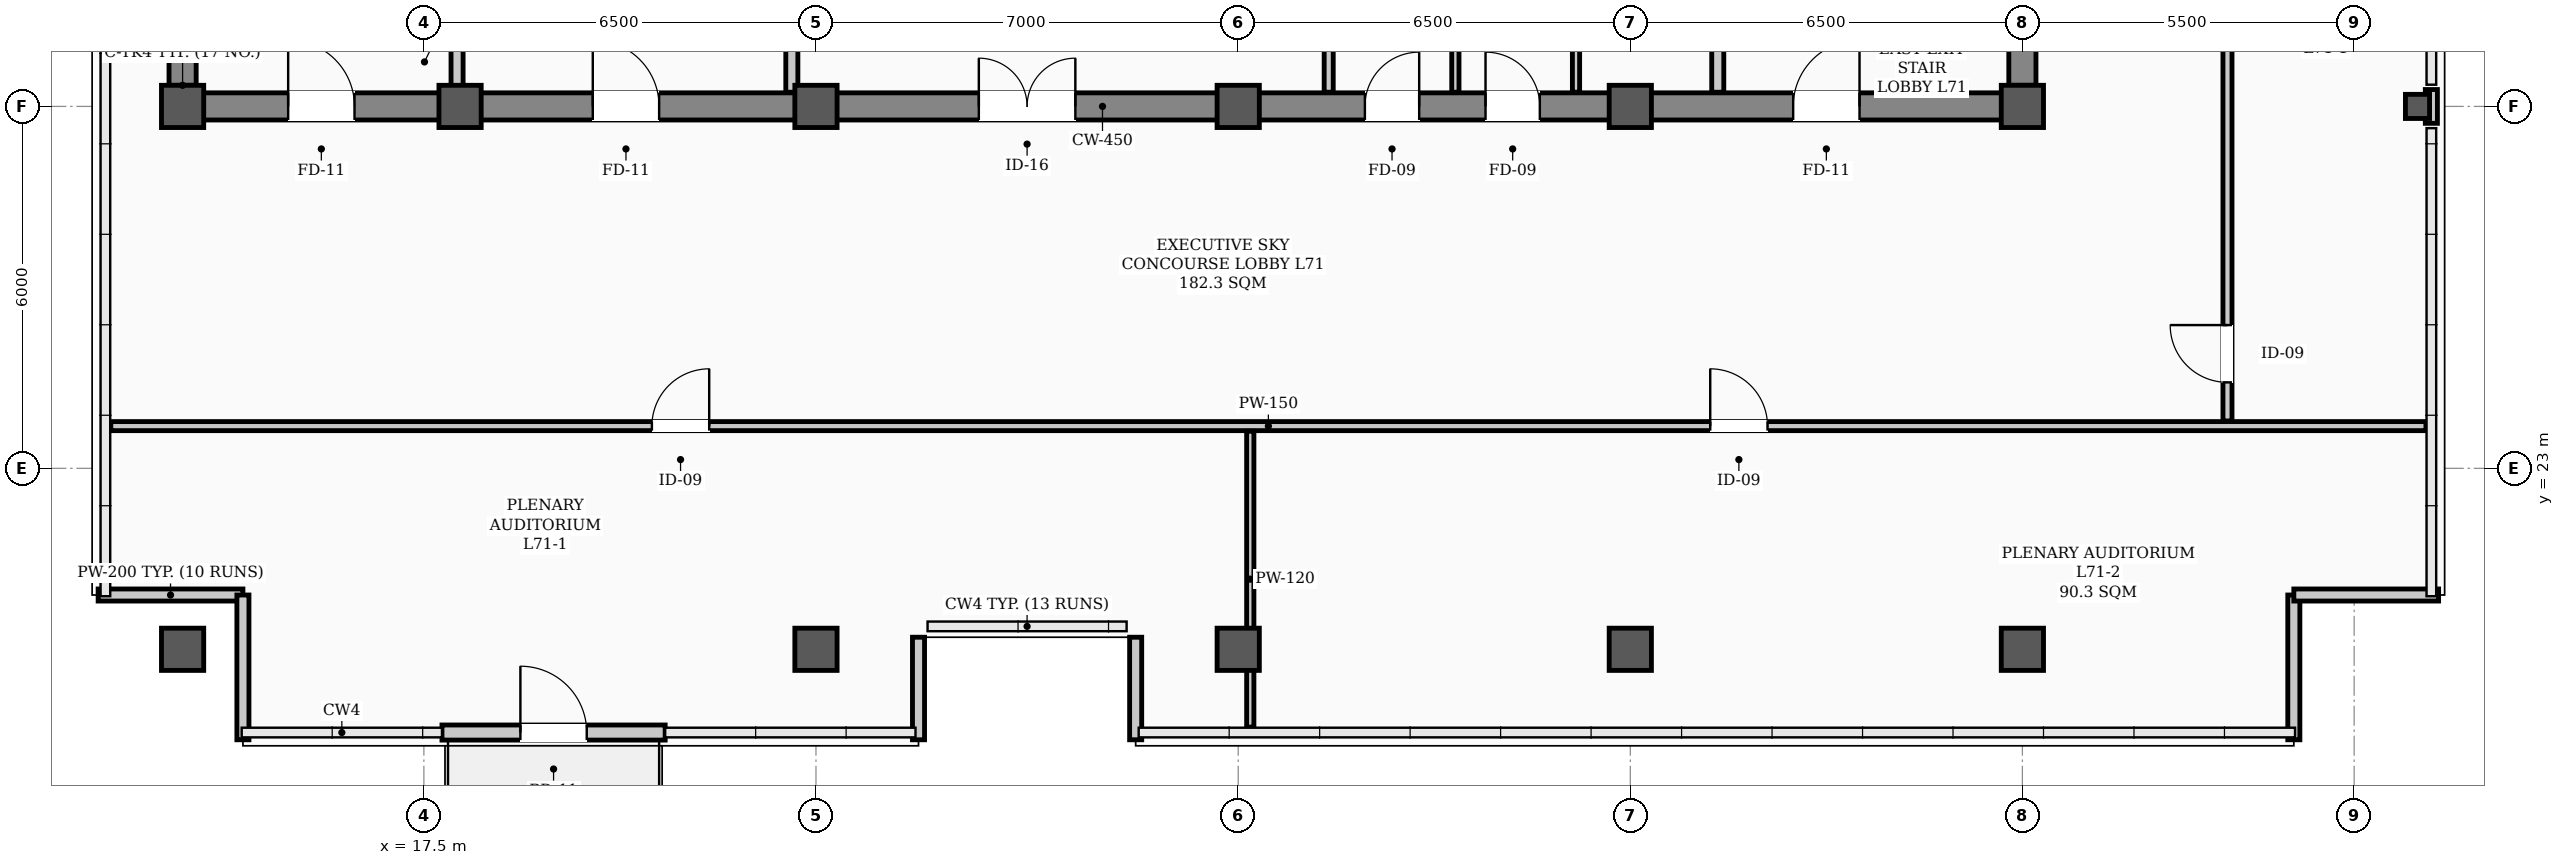
"""IFC4 building model, lengths in metres.
Left out: names, types, materials, properties, quantities, classifications, styles, units other than length and angle.
Written with IfcOpenShell. Run it as: python <this file> out.ifc"""

import sys

from ifc_helpers import new_model, si_unit, direction, frame, frame_2d, origin, origin_2d, place, context, subcontext, project, spatial, rectangle, hollow_rectangle, extrude, element, fill, save


model = new_model("IFC4")
c1 = context("Model", 3, precision=1e-05, world=origin(), true_north=direction((0.0, 1.0)))
c2 = subcontext(c1, "Body", "Model", "MODEL_VIEW")
j1 = project(units=[si_unit("LENGTHUNIT", "METRE"), si_unit("PLANEANGLEUNIT", "RADIAN")], contexts=[c1])
p1 = place(None, origin())
s1 = spatial("IfcSite", under=j1, at=p1, CompositionType="ELEMENT")
p2 = place(p1, origin())
s2 = spatial("IfcBuilding", under=s1, at=p2, CompositionType="ELEMENT")
p3 = place(p2, frame((0.0, 0.0, 285.2)))
s3 = spatial("IfcBuildingStorey", under=s2, at=p3, CompositionType="ELEMENT", Elevation=285.2)
for number, where, z_axis, x_axis in (
    (1, (13.5, 29.0, 0.0), (0.0, 0.0, 1.0), (1.0, 0.0, 0.0)),
    (2, (18.1, 29.0, 0.0), (0.0, 0.0, 1.0), (1.0, 0.0, 0.0)),
    (3, (24.0, 29.0, 0.0), (0.0, 0.0, 1.0), (1.0, 0.0, 0.0)),
    (4, (31.0, 29.0, 0.0), (0.0, 0.0, 1.0), (1.0, 0.0, 0.0)),
    (5, (37.5, 29.0, 0.0), (0.0, 0.0, 1.0), (1.0, 0.0, 0.0)),
    (6, (44.0, 29.0, 0.0), (0.0, 0.0, 1.0), (1.0, 0.0, 0.0)),
    (7, (13.5, 20.0, 0.0), (0.0, 0.0, 1.0), (1.0, 0.0, 0.0)),
    (8, (24.0, 20.0, 0.0), (0.0, 0.0, 1.0), (1.0, 0.0, 0.0)),
    (9, (31.0, 20.0, 0.0), (0.0, 0.0, 1.0), (1.0, 0.0, 0.0)),
    (10, (37.5, 20.0, 0.0), (0.0, 0.0, 1.0), (1.0, 0.0, 0.0)),
    (11, (44.0, 20.0, 0.0), (0.0, 0.0, 1.0), (1.0, 0.0, 0.0)),
):
    element("IfcColumn", number, at=place(p3, frame(where, z_axis=z_axis, x_axis=x_axis)), inside=s3, PredefinedType="COLUMN", context=c2, shape_type="SweptSolid", body=[
        extrude(hollow_rectangle(XDim=0.7, YDim=0.7, WallThickness=0.028, InnerFilletRadius=0.014, OuterFilletRadius=0.042, at=origin_2d()), origin(), (0.0, 0.0, 1.0), 3.9),
    ])
p4 = place(p3, frame((50.55, 29.0, 0.0), z_axis=(0.0, 0.0, 1.0), x_axis=(1.0, 0.0, 0.0)))
e12 = element("IfcColumn", 12, at=p4, inside=s3, PredefinedType="COLUMN", context=c2, shape_type="SweptSolid", body=[
    extrude(hollow_rectangle(XDim=0.4, YDim=0.4, WallThickness=0.02, InnerFilletRadius=0.02, OuterFilletRadius=0.04, at=origin_2d()), origin(), (0.0, 0.0, 1.0), 3.9),
])
p5 = place(p3, frame((50.78, 28.72, 0.0), z_axis=(0.0, 0.0, 1.0), x_axis=(0.0, 1.0, 0.0)))
e13 = element("IfcWall", 13, at=p5, inside=s3, PredefinedType="PARAPET", context=c2, shape_type="SweptSolid", body=[
    extrude(rectangle(XDim=0.56, YDim=0.2, at=frame_2d((0.28, 0.0))), origin(), (0.0, 0.0, 1.0), 1.2),
])
for number, where, z_axis, x_axis in (
    (14, (12.1, 20.9, 0.0), (0.0, 0.0, 1.0), (1.0, 0.0, 0.0)),
    (15, (14.5, 20.9, 0.0), (0.0, 0.0, 1.0), (0.0, -1.0, 0.0)),
    (16, (48.5, 18.5, 0.0), (0.0, 0.0, 1.0), (0.0, 1.0, 0.0)),
    (17, (48.5, 20.9, 0.0), (0.0, 0.0, 1.0), (1.0, 0.0, 0.0)),
):
    element("IfcWall", number, at=place(p3, frame(where, z_axis=z_axis, x_axis=x_axis)), inside=s3, PredefinedType="PARAPET", context=c2, shape_type="SweptSolid", body=[
        extrude(rectangle(XDim=2.4, YDim=0.2, at=frame_2d((1.2, 0.0))), origin(), (0.0, 0.0, 1.0), 1.2),
    ])
for number, where, z_axis, x_axis in (
    (18, (25.7, 18.5, 0.0), (0.0, 0.0, 1.0), (0.0, 1.0, 0.0)),
    (19, (29.3, 20.2, 0.0), (0.0, 0.0, 1.0), (0.0, -1.0, 0.0)),
):
    element("IfcWall", number, at=place(p3, frame(where, z_axis=z_axis, x_axis=x_axis)), inside=s3, PredefinedType="PARAPET", context=c2, shape_type="SweptSolid", body=[
        extrude(rectangle(XDim=1.7, YDim=0.2, at=frame_2d((0.85, 0.0))), origin(), (0.0, 0.0, 1.0), 1.2),
    ])
p6 = place(p3, frame((17.8, 18.62, 0.0), z_axis=(0.0, 0.0, 1.0), x_axis=(1.0, 0.0, 0.0)))
e20 = element("IfcWall", 20, at=p6, inside=s3, PredefinedType="STANDARD", context=c2, shape_type="SweptSolid", body=[
    extrude(rectangle(XDim=3.7, YDim=0.25, at=frame_2d((1.85, 0.0))), origin(), (0.0, 0.0, 1.0), 3.18),
])
p7 = place(p6, frame((1.3, 0.0, 0.0)))
e21 = element("IfcOpeningElement", 21, at=p7, cuts=e20, PredefinedType="OPENING", context=c2, shape_type="SweptSolid", body=[
    extrude(rectangle(XDim=1.1, YDim=2.2, at=frame_2d((0.55, 1.1))), frame((0.0, 0.135, 0.0), z_axis=(0.0, -1.0, 0.0), x_axis=(1.0, 0.0, 0.0)), (0.0, 0.0, 1.0), 0.27),
])
p8 = place(p3, frame((13.5, 29.0, 0.0), z_axis=(0.0, 0.0, 1.0), x_axis=(1.0, 0.0, 0.0)))
e22 = element("IfcWall", 22, at=p8, inside=s3, PredefinedType="SHEAR", context=c2, shape_type="SweptSolid", body=[
    extrude(rectangle(XDim=30.5, YDim=0.45, at=frame_2d((15.25, 0.0))), origin(), (0.0, 0.0, 1.0), 3.72),
])
p9 = place(p8, frame((1.75, 0.0, 0.0)))
e23 = element("IfcOpeningElement", 23, at=p9, cuts=e22, PredefinedType="OPENING", context=c2, shape_type="SweptSolid", body=[
    extrude(rectangle(XDim=1.1, YDim=2.08, at=frame_2d((0.55, 1.04))), frame((0.0, 0.235, 0.0), z_axis=(0.0, -1.0, 0.0), x_axis=(1.0, 0.0, 0.0)), (0.0, 0.0, 1.0), 0.47),
])
p10 = place(p8, frame((26.7, 0.0, 0.0)))
e24 = element("IfcOpeningElement", 24, at=p10, cuts=e22, PredefinedType="OPENING", context=c2, shape_type="SweptSolid", body=[
    extrude(rectangle(XDim=1.1, YDim=2.08, at=frame_2d((0.55, 1.04))), frame((0.0, 0.235, 0.0), z_axis=(0.0, -1.0, 0.0), x_axis=(1.0, 0.0, 0.0)), (0.0, 0.0, 1.0), 0.47),
])
p11 = place(p8, frame((6.8, 0.0, 0.0)))
e25 = element("IfcOpeningElement", 25, at=p11, cuts=e22, PredefinedType="OPENING", context=c2, shape_type="SweptSolid", body=[
    extrude(rectangle(XDim=1.1, YDim=2.08, at=frame_2d((0.55, 1.04))), frame((0.0, 0.235, 0.0), z_axis=(0.0, -1.0, 0.0), x_axis=(1.0, 0.0, 0.0)), (0.0, 0.0, 1.0), 0.47),
])
p12 = place(p8, frame((13.2, 0.0, 0.0)))
e26 = element("IfcOpeningElement", 26, at=p12, cuts=e22, PredefinedType="OPENING", context=c2, shape_type="SweptSolid", body=[
    extrude(rectangle(XDim=1.6, YDim=2.08, at=frame_2d((0.8, 1.04))), frame((0.0, 0.235, 0.0), z_axis=(0.0, -1.0, 0.0), x_axis=(1.0, 0.0, 0.0)), (0.0, 0.0, 1.0), 0.47),
])
p13 = place(p8, frame((19.6, 0.0, 0.0)))
e27 = element("IfcOpeningElement", 27, at=p13, cuts=e22, PredefinedType="OPENING", context=c2, shape_type="SweptSolid", body=[
    extrude(rectangle(XDim=0.9, YDim=2.08, at=frame_2d((0.45, 1.04))), frame((0.0, 0.235, 0.0), z_axis=(0.0, -1.0, 0.0), x_axis=(1.0, 0.0, 0.0)), (0.0, 0.0, 1.0), 0.47),
])
p14 = place(p8, frame((21.6, 0.0, 0.0)))
e28 = element("IfcOpeningElement", 28, at=p14, cuts=e22, PredefinedType="OPENING", context=c2, shape_type="SweptSolid", body=[
    extrude(rectangle(XDim=0.9, YDim=2.08, at=frame_2d((0.45, 1.04))), frame((0.0, 0.235, 0.0), z_axis=(0.0, -1.0, 0.0), x_axis=(1.0, 0.0, 0.0)), (0.0, 0.0, 1.0), 0.47),
])
for number, where, z_axis, x_axis in (
    (29, (13.5, 29.35, 0.0), (0.0, 0.0, 1.0), (0.0, 1.0, 0.0)),
    (30, (44.0, 29.35, 0.0), (0.0, 0.0, 1.0), (0.0, 1.0, 0.0)),
):
    element("IfcWall", number, at=place(p3, frame(where, z_axis=z_axis, x_axis=x_axis)), inside=s3, PredefinedType="SHEAR", context=c2, shape_type="SweptSolid", body=[
        extrude(rectangle(XDim=8.6, YDim=0.45, at=frame_2d((4.3, 0.0))), origin(), (0.0, 0.0, 1.0), 3.72),
    ])
p15 = place(p3, frame((12.31, 23.7, 0.0), z_axis=(0.0, 0.0, 1.0), x_axis=(1.0, 0.0, 0.0)))
e31 = element("IfcWall", 31, at=p15, inside=s3, PredefinedType="PARTITIONING", context=c2, shape_type="SweptSolid", body=[
    extrude(rectangle(XDim=38.38, YDim=0.15, at=frame_2d((19.19, 0.0))), origin(), (0.0, 0.0, 1.0), 3.2),
])
p16 = place(p15, frame((8.97, 0.0, 0.0)))
e32 = element("IfcOpeningElement", 32, at=p16, cuts=e31, PredefinedType="OPENING", context=c2, shape_type="SweptSolid", body=[
    extrude(rectangle(XDim=0.95, YDim=2.08, at=frame_2d((0.475, 1.04))), frame((0.0, 0.085, 0.0), z_axis=(0.0, -1.0, 0.0), x_axis=(1.0, 0.0, 0.0)), (0.0, 0.0, 1.0), 0.17),
])
p17 = place(p15, frame((26.515, 0.0, 0.0)))
e33 = element("IfcOpeningElement", 33, at=p17, cuts=e31, PredefinedType="OPENING", context=c2, shape_type="SweptSolid", body=[
    extrude(rectangle(XDim=0.95, YDim=2.08, at=frame_2d((0.475, 1.04))), frame((0.0, 0.085, 0.0), z_axis=(0.0, -1.0, 0.0), x_axis=(1.0, 0.0, 0.0)), (0.0, 0.0, 1.0), 0.17),
])
p18 = place(p3, frame((18.05, 29.235, 0.0), z_axis=(0.0, 0.0, 1.0), x_axis=(0.0, 1.0, 0.0)))
e34 = element("IfcWall", 34, at=p18, inside=s3, PredefinedType="STANDARD", context=c2, shape_type="SweptSolid", body=[
    extrude(rectangle(XDim=1.065, YDim=0.2, at=frame_2d((0.532, 0.0))), origin(), (0.0, 0.0, 1.0), 3.72),
])
p19 = place(p3, frame((38.95, 29.235, 0.0), z_axis=(0.0, 0.0, 1.0), x_axis=(0.0, 1.0, 0.0)))
e35 = element("IfcWall", 35, at=p19, inside=s3, PredefinedType="STANDARD", context=c2, shape_type="SweptSolid", body=[
    extrude(rectangle(XDim=1.065, YDim=0.2, at=frame_2d((0.532, 0.0))), origin(), (0.0, 0.0, 1.0), 3.4),
])
p20 = place(p3, frame((23.6, 29.235, 0.0), z_axis=(0.0, 0.0, 1.0), x_axis=(0.0, 1.0, 0.0)))
e36 = element("IfcWall", 36, at=p20, inside=s3, PredefinedType="STANDARD", context=c2, shape_type="SweptSolid", body=[
    extrude(rectangle(XDim=5.465, YDim=0.2, at=frame_2d((2.732, 0.0))), origin(), (0.0, 0.0, 1.0), 3.2),
])
p21 = place(p3, frame((32.5, 29.235, 0.0), z_axis=(0.0, 0.0, 1.0), x_axis=(0.0, 1.0, 0.0)))
e37 = element("IfcWall", 37, at=p21, inside=s3, PredefinedType="PARTITIONING", context=c2, shape_type="SweptSolid", body=[
    extrude(rectangle(XDim=2.53, YDim=0.15, at=frame_2d((1.265, 0.0))), origin(), (0.0, 0.0, 1.0), 3.4),
])
for number, where, z_axis, x_axis in (
    (38, (36.6, 29.235, 0.0), (0.0, 0.0, 1.0), (0.0, 1.0, 0.0)),
    (39, (34.6, 29.235, 0.0), (0.0, 0.0, 1.0), (0.0, 1.0, 0.0)),
):
    element("IfcWall", number, at=place(p3, frame(where, z_axis=z_axis, x_axis=x_axis)), inside=s3, PredefinedType="PARTITIONING", context=c2, shape_type="SweptSolid", body=[
        extrude(rectangle(XDim=2.53, YDim=0.12, at=frame_2d((1.265, 0.0))), origin(), (0.0, 0.0, 1.0), 3.4),
    ])
p22 = place(p3, frame((47.4, 23.785, 0.0), z_axis=(0.0, 0.0, 1.0), x_axis=(0.0, 1.0, 0.0)))
e40 = element("IfcWall", 40, at=p22, inside=s3, PredefinedType="PARTITIONING", context=c2, shape_type="SweptSolid", body=[
    extrude(rectangle(XDim=17.88, YDim=0.15, at=frame_2d((8.94, 0.0))), origin(), (0.0, 0.0, 1.0), 3.1),
])
p23 = place(p22, frame((0.64, 0.0, 0.0)))
e41 = element("IfcOpeningElement", 41, at=p23, cuts=e40, PredefinedType="OPENING", context=c2, shape_type="SweptSolid", body=[
    extrude(rectangle(XDim=0.95, YDim=2.08, at=frame_2d((0.475, 1.04))), frame((0.0, 0.085, 0.0), z_axis=(0.0, -1.0, 0.0), x_axis=(1.0, 0.0, 0.0)), (0.0, 0.0, 1.0), 0.17),
])
p24 = place(p22, frame((13.615, 0.0, 0.0)))
e42 = element("IfcOpeningElement", 42, at=p24, cuts=e40, PredefinedType="OPENING", context=c2, shape_type="SweptSolid", body=[
    extrude(rectangle(XDim=0.95, YDim=2.08, at=frame_2d((0.475, 1.04))), frame((0.0, 0.085, 0.0), z_axis=(0.0, -1.0, 0.0), x_axis=(1.0, 0.0, 0.0)), (0.0, 0.0, 1.0), 0.17),
])
p25 = place(p3, frame((31.2, 18.71, 0.0), z_axis=(0.0, 0.0, 1.0), x_axis=(0.0, 1.0, 0.0)))
e43 = element("IfcWall", 43, at=p25, inside=s3, PredefinedType="PARTITIONING", context=c2, shape_type="SweptSolid", body=[
    extrude(rectangle(XDim=4.905, YDim=0.12, at=frame_2d((2.453, 0.0))), origin(), (0.0, 0.0, 1.0), 3.1),
])
p26 = place(p7, origin())
e44 = element("IfcDoor", 44, at=p26, inside=s3, OperationType="SINGLE_SWING_LEFT", PredefinedType="DOOR", context=c2, shape_type="SweptSolid", body=[
    extrude(rectangle(XDim=1.1, YDim=2.2, at=frame_2d((0.55, 1.1))), frame((0.0, 0.025, 0.0), z_axis=(0.0, -1.0, 0.0), x_axis=(1.0, 0.0, 0.0)), (0.0, 0.0, 1.0), 0.05),
])
fill(e21, e44)
p27 = place(p9, origin())
e45 = element("IfcDoor", 45, at=p27, inside=s3, OperationType="SINGLE_SWING_LEFT", PredefinedType="DOOR", context=c2, shape_type="SweptSolid", body=[
    extrude(rectangle(XDim=1.1, YDim=2.08, at=frame_2d((0.55, 1.04))), frame((0.0, 0.025, 0.0), z_axis=(0.0, -1.0, 0.0), x_axis=(1.0, 0.0, 0.0)), (0.0, 0.0, 1.0), 0.05),
])
fill(e23, e45)
p28 = place(p10, origin())
e46 = element("IfcDoor", 46, at=p28, inside=s3, OperationType="SINGLE_SWING_RIGHT", PredefinedType="DOOR", context=c2, shape_type="SweptSolid", body=[
    extrude(rectangle(XDim=1.1, YDim=2.08, at=frame_2d((0.55, 1.04))), frame((0.0, 0.025, 0.0), z_axis=(0.0, -1.0, 0.0), x_axis=(1.0, 0.0, 0.0)), (0.0, 0.0, 1.0), 0.05),
])
fill(e24, e46)
p29 = place(p11, origin())
e47 = element("IfcDoor", 47, at=p29, inside=s3, OperationType="SINGLE_SWING_LEFT", PredefinedType="DOOR", context=c2, shape_type="SweptSolid", body=[
    extrude(rectangle(XDim=1.1, YDim=2.08, at=frame_2d((0.55, 1.04))), frame((0.0, 0.025, 0.0), z_axis=(0.0, -1.0, 0.0), x_axis=(1.0, 0.0, 0.0)), (0.0, 0.0, 1.0), 0.05),
])
fill(e25, e47)
p30 = place(p12, origin())
e48 = element("IfcDoor", 48, at=p30, inside=s3, OperationType="DOUBLE_DOOR_SINGLE_SWING", PredefinedType="DOOR", context=c2, shape_type="SweptSolid", body=[
    extrude(rectangle(XDim=1.6, YDim=2.08, at=frame_2d((0.8, 1.04))), frame((0.0, 0.025, 0.0), z_axis=(0.0, -1.0, 0.0), x_axis=(1.0, 0.0, 0.0)), (0.0, 0.0, 1.0), 0.05),
])
fill(e26, e48)
p31 = place(p13, origin())
e49 = element("IfcDoor", 49, at=p31, inside=s3, OperationType="SINGLE_SWING_RIGHT", PredefinedType="DOOR", context=c2, shape_type="SweptSolid", body=[
    extrude(rectangle(XDim=0.9, YDim=2.08, at=frame_2d((0.45, 1.04))), frame((0.0, 0.025, 0.0), z_axis=(0.0, -1.0, 0.0), x_axis=(1.0, 0.0, 0.0)), (0.0, 0.0, 1.0), 0.05),
])
fill(e27, e49)
p32 = place(p14, origin())
e50 = element("IfcDoor", 50, at=p32, inside=s3, OperationType="SINGLE_SWING_LEFT", PredefinedType="DOOR", context=c2, shape_type="SweptSolid", body=[
    extrude(rectangle(XDim=0.9, YDim=2.08, at=frame_2d((0.45, 1.04))), frame((0.0, 0.025, 0.0), z_axis=(0.0, -1.0, 0.0), x_axis=(1.0, 0.0, 0.0)), (0.0, 0.0, 1.0), 0.05),
])
fill(e28, e50)
p33 = place(p16, origin())
e51 = element("IfcDoor", 51, at=p33, inside=s3, OperationType="SINGLE_SWING_RIGHT", PredefinedType="DOOR", context=c2, shape_type="SweptSolid", body=[
    extrude(rectangle(XDim=0.95, YDim=2.08, at=frame_2d((0.475, 1.04))), frame((0.0, 0.025, 0.0), z_axis=(0.0, -1.0, 0.0), x_axis=(1.0, 0.0, 0.0)), (0.0, 0.0, 1.0), 0.05),
])
fill(e32, e51)
p34 = place(p17, origin())
e52 = element("IfcDoor", 52, at=p34, inside=s3, OperationType="SINGLE_SWING_LEFT", PredefinedType="DOOR", context=c2, shape_type="SweptSolid", body=[
    extrude(rectangle(XDim=0.95, YDim=2.08, at=frame_2d((0.475, 1.04))), frame((0.0, 0.025, 0.0), z_axis=(0.0, -1.0, 0.0), x_axis=(1.0, 0.0, 0.0)), (0.0, 0.0, 1.0), 0.05),
])
fill(e33, e52)
p35 = place(p23, origin())
e53 = element("IfcDoor", 53, at=p35, inside=s3, OperationType="SINGLE_SWING_RIGHT", PredefinedType="DOOR", context=c2, shape_type="SweptSolid", body=[
    extrude(rectangle(XDim=0.95, YDim=2.08, at=frame_2d((0.475, 1.04))), frame((0.0, 0.025, 0.0), z_axis=(0.0, -1.0, 0.0), x_axis=(1.0, 0.0, 0.0)), (0.0, 0.0, 1.0), 0.05),
])
fill(e41, e53)
save(model, sys.argv[1])
